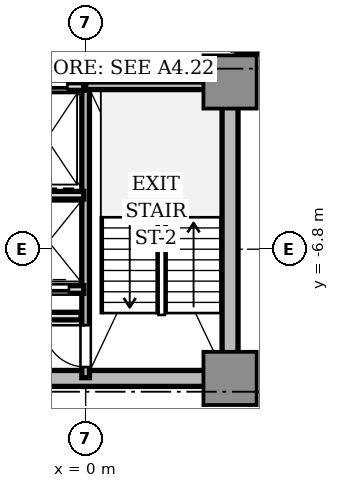
"""IFC4 building model, lengths in metres.
Left out: names, types, materials, properties, quantities, classifications, styles, units other than length and angle.
Written with IfcOpenShell. Run it as: python <this file> out.ifc"""

import sys

from ifc_helpers import new_model, si_unit, direction, frame, frame_2d, origin, origin_2d, place, context, subcontext, project, spatial, rectangle, extrude, source, transform, mapped, element, fill, save


model = new_model("IFC4")
c1 = context("Model", 3, precision=1e-05, world=origin(), true_north=direction((0.0, 1.0)))
c2 = subcontext(c1, "Body", "Model", "MODEL_VIEW")
j1 = project(units=[si_unit("LENGTHUNIT", "METRE"), si_unit("PLANEANGLEUNIT", "RADIAN")], contexts=[c1])
p1 = place(None, origin())
s1 = spatial("IfcSite", under=j1, at=p1, CompositionType="ELEMENT")
p2 = place(p1, origin())
s2 = spatial("IfcBuilding", under=s1, at=p2, CompositionType="ELEMENT")
p3 = place(p2, frame((0.0, 0.0, 128.2)))
s3 = spatial("IfcBuildingStorey", under=s2, at=p3, CompositionType="ELEMENT", Elevation=128.2)
p4 = place(p3, frame((-3.55, -10.2, 0.0), z_axis=(0.0, 0.0, 1.0), x_axis=(1.0, 0.0, 0.0)))
e1 = element("IfcWall", 1, at=p4, inside=s3, PredefinedType="SHEAR", context=c2, shape_type="SweptSolid", body=[
    extrude(rectangle(XDim=7.1, YDim=0.42, at=frame_2d((3.55, 0.0))), origin(), (0.0, 0.0, 1.0), 3.11),
])
p5 = place(p3, frame((3.8, -9.75, 0.0), z_axis=(0.0, 0.0, 1.0), x_axis=(0.0, 1.0, 0.0)))
e2 = element("IfcWall", 2, at=p5, inside=s3, PredefinedType="SHEAR", context=c2, shape_type="SweptSolid", body=[
    extrude(rectangle(XDim=6.9, YDim=0.42, at=frame_2d((3.45, 0.0))), origin(), (0.0, 0.0, 1.0), 3.11),
])
m1 = source(origin(), c2, "Body", "SweptSolid", [
    extrude(rectangle(XDim=1.4, YDim=1.4, at=origin_2d()), origin(), (0.0, 0.0, 1.0), 3.11),
])
for number, where, z_axis, x_axis in (
    (3, (3.8, -2.4, 0.0), (0.0, 0.0, 1.0), (1.0, 0.0, 0.0)),
    (4, (3.8, -10.2, 0.0), (0.0, 0.0, 1.0), (1.0, 0.0, 0.0)),
):
    element("IfcColumn", number, at=place(p3, frame(where, z_axis=z_axis, x_axis=x_axis)), inside=s3, PredefinedType="COLUMN", context=c2, shape_type="MappedRepresentation", body=[
        mapped(m1, transform((0.0, 0.0, 0.0), scale=1.0)),
    ])
p6 = place(p3, frame((0.0, -10.18, 0.0), z_axis=(0.0, 0.0, 1.0), x_axis=(0.0, 1.0, 0.0)))
e5 = element("IfcWall", 5, at=p6, inside=s3, PredefinedType="SOLIDWALL", context=c2, shape_type="SweptSolid", body=[
    extrude(rectangle(XDim=7.68, YDim=0.2, at=frame_2d((3.84, 0.0))), origin(), (0.0, 0.0, 1.0), 3.11),
])
p7 = place(p6, frame((0.28, 0.0, 0.0)))
e6 = element("IfcOpeningElement", 6, at=p7, cuts=e5, PredefinedType="OPENING", context=c2, shape_type="SweptSolid", body=[
    extrude(rectangle(XDim=1.1, YDim=2.15, at=frame_2d((0.55, 1.075))), frame((0.0, 0.11, 0.0), z_axis=(0.0, -1.0, 0.0), x_axis=(1.0, 0.0, 0.0)), (0.0, 0.0, 1.0), 0.22),
])
p8 = place(p3, frame((0.0, -2.5, 0.0), z_axis=(0.0, 0.0, 1.0), x_axis=(1.0, 0.0, 0.0)))
e7 = element("IfcWall", 7, at=p8, inside=s3, PredefinedType="SOLIDWALL", context=c2, shape_type="SweptSolid", body=[
    extrude(rectangle(XDim=3.72, YDim=0.2, at=frame_2d((1.86, 0.0))), origin(), (0.0, 0.0, 1.0), 3.11),
])
p9 = place(p3, frame((-2.0, -2.52, 0.0), z_axis=(0.0, 0.0, 1.0), x_axis=(1.0, 0.0, 0.0)))
e8 = element("IfcWall", 8, at=p9, inside=s3, PredefinedType="SOLIDWALL", context=c2, shape_type="SweptSolid", body=[
    extrude(rectangle(XDim=1.95, YDim=0.2, at=frame_2d((0.975, 0.0))), origin(), (0.0, 0.0, 1.0), 2.66),
])
p10 = place(p9, frame((0.42, 0.0, 0.0)))
e9 = element("IfcOpeningElement", 9, at=p10, cuts=e8, PredefinedType="OPENING", context=c2, shape_type="SweptSolid", body=[
    extrude(rectangle(XDim=1.1, YDim=2.2, at=frame_2d((0.55, 1.1))), frame((0.0, 0.11, 0.0), z_axis=(0.0, -1.0, 0.0), x_axis=(1.0, 0.0, 0.0)), (0.0, 0.0, 1.0), 0.22),
])
p11 = place(p3, frame((-3.74, -5.38, 0.0), z_axis=(0.0, 0.0, 1.0), x_axis=(1.0, 0.0, 0.0)))
e10 = element("IfcWall", 10, at=p11, inside=s3, PredefinedType="SOLIDWALL", context=c2, shape_type="SweptSolid", body=[
    extrude(rectangle(XDim=3.69, YDim=0.2, at=frame_2d((1.845, 0.0))), origin(), (0.0, 0.0, 1.0), 2.66),
])
p12 = place(p3, frame((-1.9, -7.86, 0.0), z_axis=(0.0, 0.0, 1.0), x_axis=(1.0, 0.0, 0.0)))
e11 = element("IfcWall", 11, at=p12, inside=s3, PredefinedType="SOLIDWALL", context=c2, shape_type="SweptSolid", body=[
    extrude(rectangle(XDim=1.85, YDim=0.2, at=frame_2d((0.925, 0.0))), origin(), (0.0, 0.0, 1.0), 2.66),
])
p13 = place(p12, frame((0.36, 0.0, 0.0)))
e12 = element("IfcOpeningElement", 12, at=p13, cuts=e11, PredefinedType="OPENING", context=c2, shape_type="SweptSolid", body=[
    extrude(rectangle(XDim=1.1, YDim=2.2, at=frame_2d((0.55, 1.1))), frame((0.0, 0.11, 0.0), z_axis=(0.0, -1.0, 0.0), x_axis=(1.0, 0.0, 0.0)), (0.0, 0.0, 1.0), 0.22),
])
p14 = place(p3, frame((3.98, -1.56, 0.0), z_axis=(0.0, 0.0, 1.0), x_axis=(1.0, 0.0, 0.0)))
e13 = element("IfcWall", 13, at=p14, inside=s3, PredefinedType="SOLIDWALL", context=c2, shape_type="SweptSolid", body=[
    extrude(rectangle(XDim=1.64, YDim=0.2, at=frame_2d((0.82, 0.0))), origin(), (0.0, 0.0, 1.0), 2.66),
])
p15 = place(p3, frame((-3.74, -8.56, 0.0), z_axis=(0.0, 0.0, 1.0), x_axis=(1.0, 0.0, 0.0)))
e14 = element("IfcWall", 14, at=p15, inside=s3, PredefinedType="SOLIDWALL", context=c2, shape_type="SweptSolid", body=[
    extrude(rectangle(XDim=3.62, YDim=0.2, at=frame_2d((1.81, 0.0))), origin(), (0.0, 0.0, 1.0), 2.66),
])
p16 = place(p15, frame((1.0, 0.0, 0.0)))
e15 = element("IfcOpeningElement", 15, at=p16, cuts=e14, PredefinedType="OPENING", context=c2, shape_type="SweptSolid", body=[
    extrude(rectangle(XDim=0.95, YDim=2.15, at=frame_2d((0.475, 1.075))), frame((0.0, 0.11, 0.0), z_axis=(0.0, -1.0, 0.0), x_axis=(1.0, 0.0, 0.0)), (0.0, 0.0, 1.0), 0.22),
])
p17 = place(p3, frame((3.542, -11.206, 0.0), z_axis=(0.0, 0.0, 1.0), x_axis=(0.999046129111, 0.04366728647, 0.0)))
e16 = element("IfcWall", 16, at=p17, inside=s3, PredefinedType="PARTITIONING", context=c2, shape_type="SweptSolid", body=[
    extrude(rectangle(XDim=3.5, YDim=0.18, at=frame_2d((1.75, 0.0))), origin(), (0.0, 0.0, 1.0), 2.66),
])
m2 = source(origin(), c2, "Body", "SweptSolid", [
    extrude(rectangle(XDim=1.1, YDim=0.05, at=origin_2d()), origin(), (0.0, 0.0, 1.0), 2.2),
])
p18 = place(p10, frame((0.55, 0.0, 0.0)))
e17 = element("IfcDoor", 17, at=p18, inside=s3, OperationType="DOUBLE_DOOR_SLIDING", PredefinedType="DOOR", context=c2, shape_type="MappedRepresentation", body=[
    mapped(m2, transform((0.0, 0.0, 0.0), scale=1.0)),
])
fill(e9, e17)
p19 = place(p13, frame((0.55, 0.0, 0.0)))
e18 = element("IfcDoor", 18, at=p19, inside=s3, OperationType="DOUBLE_DOOR_SLIDING", PredefinedType="DOOR", context=c2, shape_type="MappedRepresentation", body=[
    mapped(m2, transform((0.0, 0.0, 0.0), scale=1.0)),
])
fill(e12, e18)
m3 = source(origin(), c2, "Body", "SweptSolid", [
    extrude(rectangle(XDim=1.1, YDim=0.05, at=origin_2d()), origin(), (0.0, 0.0, 1.0), 2.15),
])
p20 = place(p7, frame((0.55, 0.0, 0.0)))
e19 = element("IfcDoor", 19, at=p20, inside=s3, OperationType="SINGLE_SWING_RIGHT", PredefinedType="DOOR", context=c2, shape_type="MappedRepresentation", body=[
    mapped(m3, transform((0.0, 0.0, 0.0), scale=1.0)),
])
fill(e6, e19)
save(model, sys.argv[1])
